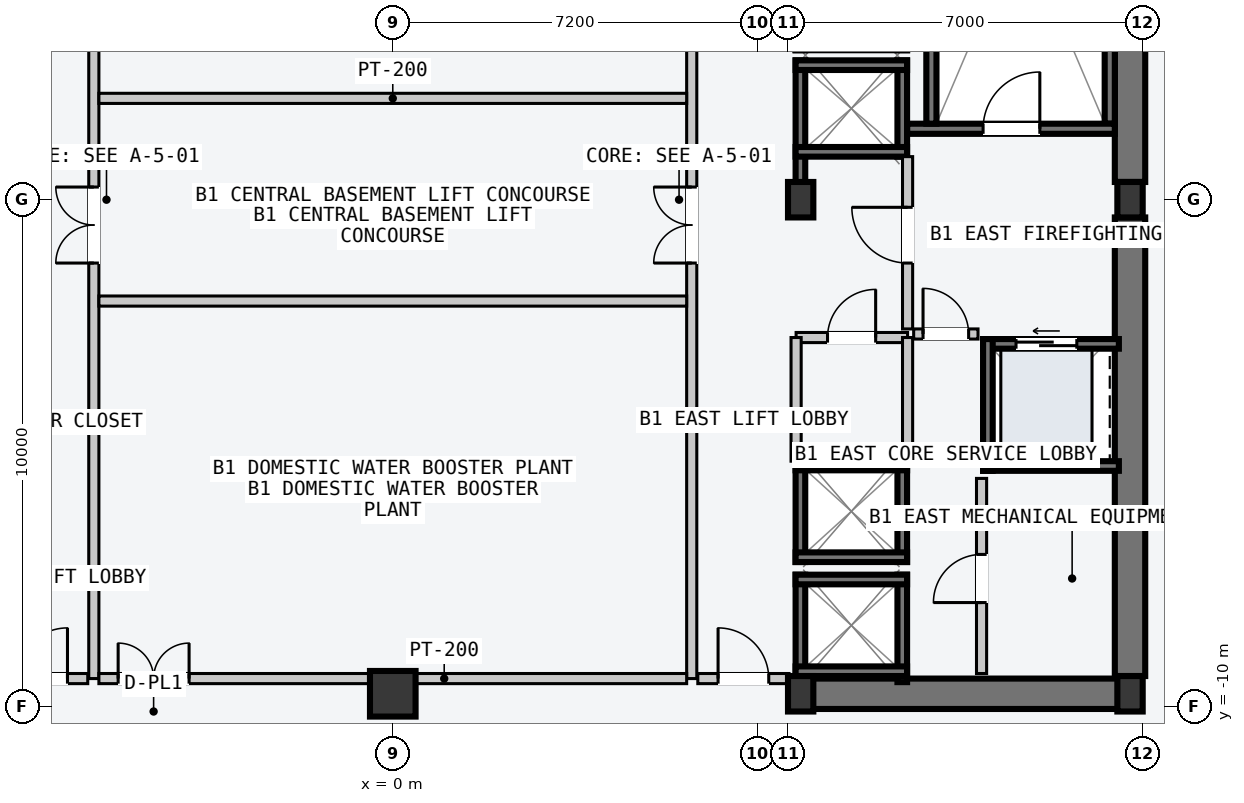
"""IFC4 building model, lengths in metres.
Left out: names, types, materials, properties, quantities, classifications, styles, units other than length and angle.
Written with IfcOpenShell. Run it as: python <this file> out.ifc"""

import sys

from ifc_helpers import new_model, si_unit, direction, frame, frame_2d, origin, origin_2d, place, context, subcontext, project, spatial, rectangle, hollow_rectangle, i_section, extrude, element, fill, save


model = new_model("IFC4")
c1 = context("Model", 3, precision=1e-05, world=origin(), true_north=direction((0.0, 1.0)))
c2 = subcontext(c1, "Body", "Model", "MODEL_VIEW")
j1 = project(units=[si_unit("LENGTHUNIT", "METRE"), si_unit("PLANEANGLEUNIT", "RADIAN")], contexts=[c1])
p1 = place(None, origin())
s1 = spatial("IfcSite", under=j1, at=p1, CompositionType="ELEMENT")
p2 = place(p1, origin())
s2 = spatial("IfcBuilding", under=s1, at=p2, CompositionType="ELEMENT")
p3 = place(p2, frame((0.0, 0.0, -4.8)))
s3 = spatial("IfcBuildingStorey", under=s2, at=p3, CompositionType="ELEMENT", Elevation=-4.8)
p4 = place(p3, frame((8.07, -9.75, -0.22), z_axis=(0.0, 0.0, 1.0), x_axis=(1.0, 0.0, 0.0)))
e1 = element("IfcWall", 1, at=p4, inside=s3, PredefinedType="SHEAR", context=c2, shape_type="SweptSolid", body=[
    extrude(rectangle(XDim=6.46, YDim=0.6, at=frame_2d((3.23, 0.0))), origin(), (0.0, 0.0, 1.0), 4.8),
])
for number, where, z_axis, x_axis in (
    (2, (14.55, -9.4, -0.22), (0.0, 0.0, 1.0), (0.0, 1.0, 0.0)),
    (3, (14.55, 0.35, -0.22), (0.0, 0.0, 1.0), (0.0, 1.0, 0.0)),
):
    element("IfcWall", number, at=place(p3, frame(where, z_axis=z_axis, x_axis=x_axis)), inside=s3, PredefinedType="SHEAR", context=c2, shape_type="SweptSolid", body=[
        extrude(rectangle(XDim=9.05, YDim=0.6, at=frame_2d((4.525, 0.0))), origin(), (0.0, 0.0, 1.0), 4.8),
    ])
p5 = place(p3, frame((14.15, 1.5, -0.22), z_axis=(0.0, 0.0, 1.0), x_axis=(0.0, 1.0, 0.0)))
e4 = element("IfcWall", 4, at=p5, inside=s3, PredefinedType="SOLIDWALL", context=c2, shape_type="SweptSolid", body=[
    extrude(rectangle(XDim=7.8, YDim=0.2, at=frame_2d((3.9, 0.0))), origin(), (0.0, 0.0, 1.0), 4.8),
])
p6 = place(p3, frame((10.15, 1.4, -0.22), z_axis=(0.0, 0.0, 1.0), x_axis=(1.0, 0.0, 0.0)))
e5 = element("IfcWall", 5, at=p6, inside=s3, PredefinedType="SOLIDWALL", context=c2, shape_type="SweptSolid", body=[
    extrude(rectangle(XDim=4.1, YDim=0.2, at=frame_2d((2.05, 0.0))), origin(), (0.0, 0.0, 1.0), 4.8),
])
p7 = place(p6, frame((1.5, 0.0, 0.22)))
e6 = element("IfcOpeningElement", 6, at=p7, cuts=e5, PredefinedType="OPENING", context=c2, shape_type="SweptSolid", body=[
    extrude(rectangle(XDim=1.12, YDim=2.18, at=frame_2d((0.56, 1.09))), frame((0.0, 0.11, 0.0), z_axis=(0.0, -1.0, 0.0), x_axis=(1.0, 0.0, 0.0)), (0.0, 0.0, 1.0), 0.22),
])
p8 = place(p3, frame((10.63, 1.5, -0.22), z_axis=(0.0, 0.0, 1.0), x_axis=(0.0, 1.0, 0.0)))
e7 = element("IfcWall", 7, at=p8, inside=s3, PredefinedType="SOLIDWALL", context=c2, shape_type="SweptSolid", body=[
    extrude(rectangle(XDim=7.8, YDim=0.2, at=frame_2d((3.9, 0.0))), origin(), (0.0, 0.0, 1.0), 4.8),
])
for number, where, z_axis, x_axis in (
    (8, (8.05, -9.75, 0.0), (0.0, 0.0, 1.0), (1.0, 0.0, 0.0)),
    (9, (8.05, 0.0, 0.0), (0.0, 0.0, 1.0), (1.0, 0.0, 0.0)),
    (10, (14.55, -9.75, 0.0), (0.0, 0.0, 1.0), (1.0, 0.0, 0.0)),
    (11, (14.55, 0.0, 0.0), (0.0, 0.0, 1.0), (1.0, 0.0, 0.0)),
):
    element("IfcColumn", number, at=place(p3, frame(where, z_axis=z_axis, x_axis=x_axis)), inside=s3, PredefinedType="COLUMN", context=c2, shape_type="SweptSolid", body=[
        extrude(i_section(OverallWidth=0.5, OverallDepth=0.7, WebThickness=0.028, FlangeThickness=0.045, at=origin_2d()), origin(), (0.0, 0.0, 1.0), 4.8),
    ])
p9 = place(p3, frame((0.0, -9.75, 0.0), z_axis=(0.0, 0.0, 1.0), x_axis=(1.0, 0.0, 0.0)))
e12 = element("IfcColumn", 12, at=p9, inside=s3, PredefinedType="COLUMN", context=c2, shape_type="SweptSolid", body=[
    extrude(hollow_rectangle(XDim=0.9, YDim=0.9, WallThickness=0.045, at=origin_2d()), origin(), (0.0, 0.0, 1.0), 4.8),
])
p10 = place(p3, frame((8.045, 0.21, -0.22), z_axis=(0.0, 0.0, 1.0), x_axis=(0.0, 1.0, 0.0)))
e13 = element("IfcWall", 13, at=p10, inside=s3, PredefinedType="SOLIDWALL", context=c2, shape_type="SweptSolid", body=[
    extrude(rectangle(XDim=2.54, YDim=0.19, at=frame_2d((1.27, 0.0))), origin(), (0.0, 0.0, 1.0), 4.8),
])
p11 = place(p3, frame((10.055, 0.85, -0.22), z_axis=(0.0, 0.0, 1.0), x_axis=(0.0, 1.0, 0.0)))
e14 = element("IfcWall", 14, at=p11, inside=s3, PredefinedType="SOLIDWALL", context=c2, shape_type="SweptSolid", body=[
    extrude(rectangle(XDim=1.9, YDim=0.19, at=frame_2d((0.95, 0.0))), origin(), (0.0, 0.0, 1.0), 4.8),
])
for number, where, z_axis, x_axis in (
    (15, (7.95, 2.655, -0.22), (0.0, 0.0, 1.0), (1.0, 0.0, 0.0)),
    (16, (7.95, 0.945, -0.22), (0.0, 0.0, 1.0), (1.0, 0.0, 0.0)),
):
    element("IfcWall", number, at=place(p3, frame(where, z_axis=z_axis, x_axis=x_axis)), inside=s3, PredefinedType="SOLIDWALL", context=c2, shape_type="SweptSolid", body=[
        extrude(rectangle(XDim=2.2, YDim=0.19, at=frame_2d((1.1, 0.0))), origin(), (0.0, 0.0, 1.0), 4.8),
    ])
for number, where, z_axis, x_axis in (
    (17, (8.045, -9.52, -0.22), (0.0, 0.0, 1.0), (0.0, 1.0, 0.0)),
    (18, (10.055, -9.52, -0.22), (0.0, 0.0, 1.0), (0.0, 1.0, 0.0)),
):
    element("IfcWall", number, at=place(p3, frame(where, z_axis=z_axis, x_axis=x_axis)), inside=s3, PredefinedType="SOLIDWALL", context=c2, shape_type="SweptSolid", body=[
        extrude(rectangle(XDim=2.12, YDim=0.19, at=frame_2d((1.06, 0.0))), origin(), (0.0, 0.0, 1.0), 4.8),
    ])
for number, where, z_axis, x_axis in (
    (19, (7.95, -7.495, -0.22), (0.0, 0.0, 1.0), (1.0, 0.0, 0.0)),
    (20, (7.95, -9.305, -0.22), (0.0, 0.0, 1.0), (1.0, 0.0, 0.0)),
):
    element("IfcWall", number, at=place(p3, frame(where, z_axis=z_axis, x_axis=x_axis)), inside=s3, PredefinedType="SOLIDWALL", context=c2, shape_type="SweptSolid", body=[
        extrude(rectangle(XDim=2.2, YDim=0.19, at=frame_2d((1.1, 0.0))), origin(), (0.0, 0.0, 1.0), 4.8),
    ])
for number, where, z_axis, x_axis in (
    (21, (8.045, -7.15, -0.22), (0.0, 0.0, 1.0), (0.0, 1.0, 0.0)),
    (22, (10.055, -7.15, -0.22), (0.0, 0.0, 1.0), (0.0, 1.0, 0.0)),
):
    element("IfcWall", number, at=place(p3, frame(where, z_axis=z_axis, x_axis=x_axis)), inside=s3, PredefinedType="SOLIDWALL", context=c2, shape_type="SweptSolid", body=[
        extrude(rectangle(XDim=2.0, YDim=0.19, at=frame_2d((1.0, 0.0))), origin(), (0.0, 0.0, 1.0), 4.8),
    ])
for number, where, z_axis, x_axis in (
    (23, (7.95, -5.245, -0.22), (0.0, 0.0, 1.0), (1.0, 0.0, 0.0)),
    (24, (7.95, -7.055, -0.22), (0.0, 0.0, 1.0), (1.0, 0.0, 0.0)),
):
    element("IfcWall", number, at=place(p3, frame(where, z_axis=z_axis, x_axis=x_axis)), inside=s3, PredefinedType="SOLIDWALL", context=c2, shape_type="SweptSolid", body=[
        extrude(rectangle(XDim=2.2, YDim=0.19, at=frame_2d((1.1, 0.0))), origin(), (0.0, 0.0, 1.0), 4.8),
    ])
p12 = place(p3, frame((11.65, -2.845, -0.22), z_axis=(0.0, 0.0, 1.0), x_axis=(1.0, 0.0, 0.0)))
e25 = element("IfcWall", 25, at=p12, inside=s3, PredefinedType="SOLIDWALL", context=c2, shape_type="SweptSolid", body=[
    extrude(rectangle(XDim=2.68, YDim=0.19, at=frame_2d((1.34, 0.0))), origin(), (0.0, 0.0, 1.0), 4.8),
])
p13 = place(p12, frame((0.65, 0.0, 0.22)))
e26 = element("IfcOpeningElement", 26, at=p13, cuts=e25, PredefinedType="OPENING", context=c2, shape_type="SweptSolid", body=[
    extrude(rectangle(XDim=1.2, YDim=2.2, at=frame_2d((0.6, 1.1))), frame((0.0, 0.105, 0.0), z_axis=(0.0, -1.0, 0.0), x_axis=(1.0, 0.0, 0.0)), (0.0, 0.0, 1.0), 0.21),
])
p14 = place(p3, frame((11.65, -5.255, -0.22), z_axis=(0.0, 0.0, 1.0), x_axis=(1.0, 0.0, 0.0)))
e27 = element("IfcWall", 27, at=p14, inside=s3, PredefinedType="SOLIDWALL", context=c2, shape_type="SweptSolid", body=[
    extrude(rectangle(XDim=2.68, YDim=0.19, at=frame_2d((1.34, 0.0))), origin(), (0.0, 0.0, 1.0), 4.8),
])
p15 = place(p3, frame((11.745, -5.35, -0.22), z_axis=(0.0, 0.0, 1.0), x_axis=(0.0, 1.0, 0.0)))
e28 = element("IfcWall", 28, at=p15, inside=s3, PredefinedType="SOLIDWALL", context=c2, shape_type="SweptSolid", body=[
    extrude(rectangle(XDim=2.6, YDim=0.19, at=frame_2d((1.3, 0.0))), origin(), (0.0, 0.0, 1.0), 4.8),
])
p16 = place(p3, frame((-5.9, -9.45, 0.0), z_axis=(0.0, 0.0, 1.0), x_axis=(0.0, 1.0, 0.0)))
e29 = element("IfcWall", 29, at=p16, inside=s3, PredefinedType="PARTITIONING", context=c2, shape_type="SweptSolid", body=[
    extrude(rectangle(XDim=18.9, YDim=0.2, at=frame_2d((9.45, 0.0))), origin(), (0.0, 0.0, 1.0), 4.58),
])
p17 = place(p16, frame((8.2, 0.0, 0.0)))
e30 = element("IfcOpeningElement", 30, at=p17, cuts=e29, PredefinedType="OPENING", context=c2, shape_type="SweptSolid", body=[
    extrude(rectangle(XDim=1.5, YDim=2.2, at=frame_2d((0.75, 1.1))), frame((0.0, 0.11, 0.0), z_axis=(0.0, -1.0, 0.0), x_axis=(1.0, 0.0, 0.0)), (0.0, 0.0, 1.0), 0.22),
])
p18 = place(p3, frame((5.9, -9.45, 0.0), z_axis=(0.0, 0.0, 1.0), x_axis=(0.0, 1.0, 0.0)))
e31 = element("IfcWall", 31, at=p18, inside=s3, PredefinedType="PARTITIONING", context=c2, shape_type="SweptSolid", body=[
    extrude(rectangle(XDim=18.9, YDim=0.2, at=frame_2d((9.45, 0.0))), origin(), (0.0, 0.0, 1.0), 4.58),
])
p19 = place(p18, frame((8.2, 0.0, 0.0)))
e32 = element("IfcOpeningElement", 32, at=p19, cuts=e31, PredefinedType="OPENING", context=c2, shape_type="SweptSolid", body=[
    extrude(rectangle(XDim=1.5, YDim=2.2, at=frame_2d((0.75, 1.1))), frame((0.0, 0.11, 0.0), z_axis=(0.0, -1.0, 0.0), x_axis=(1.0, 0.0, 0.0)), (0.0, 0.0, 1.0), 0.22),
])
p20 = place(p3, frame((10.16, -2.55, 0.0), z_axis=(0.0, 0.0, 1.0), x_axis=(0.0, 1.0, 0.0)))
e33 = element("IfcWall", 33, at=p20, inside=s3, PredefinedType="PARTITIONING", context=c2, shape_type="SweptSolid", body=[
    extrude(rectangle(XDim=3.4, YDim=0.2, at=frame_2d((1.7, 0.0))), origin(), (0.0, 0.0, 1.0), 4.58),
])
p21 = place(p20, frame((1.3, 0.0, 0.0)))
e34 = element("IfcOpeningElement", 34, at=p21, cuts=e33, PredefinedType="OPENING", context=c2, shape_type="SweptSolid", body=[
    extrude(rectangle(XDim=1.1, YDim=2.15, at=frame_2d((0.55, 1.075))), frame((0.0, 0.11, 0.0), z_axis=(0.0, -1.0, 0.0), x_axis=(1.0, 0.0, 0.0)), (0.0, 0.0, 1.0), 0.22),
])
p22 = place(p3, frame((10.28, -2.65, 0.0), z_axis=(0.0, 0.0, 1.0), x_axis=(1.0, 0.0, 0.0)))
e35 = element("IfcWall", 35, at=p22, inside=s3, PredefinedType="PARTITIONING", context=c2, shape_type="SweptSolid", body=[
    extrude(rectangle(XDim=1.27, YDim=0.2, at=frame_2d((0.635, 0.0))), origin(), (0.0, 0.0, 1.0), 4.58),
])
p23 = place(p22, frame((0.185, 0.0, 0.0)))
e36 = element("IfcOpeningElement", 36, at=p23, cuts=e35, PredefinedType="OPENING", context=c2, shape_type="SweptSolid", body=[
    extrude(rectangle(XDim=0.9, YDim=2.15, at=frame_2d((0.45, 1.075))), frame((0.0, 0.11, 0.0), z_axis=(0.0, -1.0, 0.0), x_axis=(1.0, 0.0, 0.0)), (0.0, 0.0, 1.0), 0.22),
])
p24 = place(p3, frame((7.96, -2.72, 0.0), z_axis=(0.0, 0.0, 1.0), x_axis=(1.0, 0.0, 0.0)))
e37 = element("IfcWall", 37, at=p24, inside=s3, PredefinedType="PARTITIONING", context=c2, shape_type="SweptSolid", body=[
    extrude(rectangle(XDim=2.2, YDim=0.2, at=frame_2d((1.1, 0.0))), origin(), (0.0, 0.0, 1.0), 4.58),
])
p25 = place(p24, frame((0.62, 0.0, 0.0)))
e38 = element("IfcOpeningElement", 38, at=p25, cuts=e37, PredefinedType="OPENING", context=c2, shape_type="SweptSolid", body=[
    extrude(rectangle(XDim=0.95, YDim=2.1, at=frame_2d((0.475, 1.05))), frame((0.0, 0.11, 0.0), z_axis=(0.0, -1.0, 0.0), x_axis=(1.0, 0.0, 0.0)), (0.0, 0.0, 1.0), 0.22),
])
for number, where, z_axis, x_axis in (
    (39, (7.96, -5.16, 0.0), (0.0, 0.0, 1.0), (0.0, 1.0, 0.0)),
    (40, (10.16, -5.16, 0.0), (0.0, 0.0, 1.0), (0.0, 1.0, 0.0)),
):
    element("IfcWall", number, at=place(p3, frame(where, z_axis=z_axis, x_axis=x_axis)), inside=s3, PredefinedType="PARTITIONING", context=c2, shape_type="SweptSolid", body=[
        extrude(rectangle(XDim=2.44, YDim=0.2, at=frame_2d((1.22, 0.0))), origin(), (0.0, 0.0, 1.0), 4.58),
    ])
p26 = place(p3, frame((11.62, -9.35, 0.0), z_axis=(0.0, 0.0, 1.0), x_axis=(0.0, 1.0, 0.0)))
e41 = element("IfcWall", 41, at=p26, inside=s3, PredefinedType="PARTITIONING", context=c2, shape_type="SweptSolid", body=[
    extrude(rectangle(XDim=3.85, YDim=0.2, at=frame_2d((1.925, 0.0))), origin(), (0.0, 0.0, 1.0), 4.58),
])
p27 = place(p26, frame((1.4, 0.0, 0.0)))
e42 = element("IfcOpeningElement", 42, at=p27, cuts=e41, PredefinedType="OPENING", context=c2, shape_type="SweptSolid", body=[
    extrude(rectangle(XDim=0.95, YDim=2.1, at=frame_2d((0.475, 1.05))), frame((0.0, 0.11, 0.0), z_axis=(0.0, -1.0, 0.0), x_axis=(1.0, 0.0, 0.0)), (0.0, 0.0, 1.0), 0.22),
])
p28 = place(p3, frame((-7.82, -9.45, 0.0), z_axis=(0.0, 0.0, 1.0), x_axis=(1.0, 0.0, 0.0)))
e43 = element("IfcWall", 43, at=p28, inside=s3, PredefinedType="PARTITIONING", context=c2, shape_type="SweptSolid", body=[
    extrude(rectangle(XDim=1.8, YDim=0.2, at=frame_2d((0.9, 0.0))), origin(), (0.0, 0.0, 1.0), 4.58),
])
p29 = place(p28, frame((0.4, 0.0, 0.0)))
e44 = element("IfcOpeningElement", 44, at=p29, cuts=e43, PredefinedType="OPENING", context=c2, shape_type="SweptSolid", body=[
    extrude(rectangle(XDim=1.0, YDim=2.15, at=frame_2d((0.5, 1.075))), frame((0.0, 0.11, 0.0), z_axis=(0.0, -1.0, 0.0), x_axis=(1.0, 0.0, 0.0)), (0.0, 0.0, 1.0), 0.22),
])
p30 = place(p3, frame((6.02, -9.45, 0.0), z_axis=(0.0, 0.0, 1.0), x_axis=(1.0, 0.0, 0.0)))
e45 = element("IfcWall", 45, at=p30, inside=s3, PredefinedType="PARTITIONING", context=c2, shape_type="SweptSolid", body=[
    extrude(rectangle(XDim=1.8, YDim=0.2, at=frame_2d((0.9, 0.0))), origin(), (0.0, 0.0, 1.0), 4.58),
])
p31 = place(p30, frame((0.4, 0.0, 0.0)))
e46 = element("IfcOpeningElement", 46, at=p31, cuts=e45, PredefinedType="OPENING", context=c2, shape_type="SweptSolid", body=[
    extrude(rectangle(XDim=1.0, YDim=2.15, at=frame_2d((0.5, 1.075))), frame((0.0, 0.11, 0.0), z_axis=(0.0, -1.0, 0.0), x_axis=(1.0, 0.0, 0.0)), (0.0, 0.0, 1.0), 0.22),
])
p32 = place(p3, frame((-5.8, -9.45, 0.0), z_axis=(0.0, 0.0, 1.0), x_axis=(1.0, 0.0, 0.0)))
e47 = element("IfcWall", 47, at=p32, inside=s3, PredefinedType="PARTITIONING", context=c2, shape_type="SweptSolid", body=[
    extrude(rectangle(XDim=11.6, YDim=0.2, at=frame_2d((5.8, 0.0))), origin(), (0.0, 0.0, 1.0), 4.58),
])
p33 = place(p32, frame((0.38, 0.0, 0.0)))
e48 = element("IfcOpeningElement", 48, at=p33, cuts=e47, PredefinedType="OPENING", context=c2, shape_type="SweptSolid", body=[
    extrude(rectangle(XDim=1.4, YDim=2.25, at=frame_2d((0.7, 1.125))), frame((0.0, 0.11, 0.0), z_axis=(0.0, -1.0, 0.0), x_axis=(1.0, 0.0, 0.0)), (0.0, 0.0, 1.0), 0.22),
])
for number, where, z_axis, x_axis in (
    (49, (-5.8, -2.0, 0.0), (0.0, 0.0, 1.0), (1.0, 0.0, 0.0)),
    (50, (-5.8, 2.0, 0.0), (0.0, 0.0, 1.0), (1.0, 0.0, 0.0)),
):
    element("IfcWall", number, at=place(p3, frame(where, z_axis=z_axis, x_axis=x_axis)), inside=s3, PredefinedType="PARTITIONING", context=c2, shape_type="SweptSolid", body=[
        extrude(rectangle(XDim=11.6, YDim=0.2, at=frame_2d((5.8, 0.0))), origin(), (0.0, 0.0, 1.0), 4.58),
    ])
p34 = place(p7, origin())
e51 = element("IfcDoor", 51, at=p34, inside=s3, OperationType="SINGLE_SWING_RIGHT", PredefinedType="DOOR", context=c2, shape_type="SweptSolid", body=[
    extrude(rectangle(XDim=1.12, YDim=2.18, at=frame_2d((0.56, 1.09))), frame((0.0, 0.025, 0.0), z_axis=(0.0, -1.0, 0.0), x_axis=(1.0, 0.0, 0.0)), (0.0, 0.0, 1.0), 0.05),
])
fill(e6, e51)
p35 = place(p13, origin())
e52 = element("IfcDoor", 52, at=p35, inside=s3, OperationType="SLIDING_TO_LEFT", PredefinedType="DOOR", context=c2, shape_type="SweptSolid", body=[
    extrude(rectangle(XDim=1.2, YDim=2.2, at=frame_2d((0.6, 1.1))), frame((0.0, 0.025, 0.0), z_axis=(0.0, -1.0, 0.0), x_axis=(1.0, 0.0, 0.0)), (0.0, 0.0, 1.0), 0.05),
])
fill(e26, e52)
p36 = place(p17, origin())
e53 = element("IfcDoor", 53, at=p36, inside=s3, OperationType="DOUBLE_DOOR_SINGLE_SWING", PredefinedType="DOOR", context=c2, shape_type="SweptSolid", body=[
    extrude(rectangle(XDim=1.5, YDim=2.2, at=frame_2d((0.75, 1.1))), frame((0.0, 0.025, 0.0), z_axis=(0.0, -1.0, 0.0), x_axis=(1.0, 0.0, 0.0)), (0.0, 0.0, 1.0), 0.05),
])
fill(e30, e53)
p37 = place(p19, origin())
e54 = element("IfcDoor", 54, at=p37, inside=s3, OperationType="DOUBLE_DOOR_SINGLE_SWING", PredefinedType="DOOR", context=c2, shape_type="SweptSolid", body=[
    extrude(rectangle(XDim=1.5, YDim=2.2, at=frame_2d((0.75, 1.1))), frame((0.0, 0.025, 0.0), z_axis=(0.0, -1.0, 0.0), x_axis=(1.0, 0.0, 0.0)), (0.0, 0.0, 1.0), 0.05),
])
fill(e32, e54)
p38 = place(p21, origin())
e55 = element("IfcDoor", 55, at=p38, inside=s3, OperationType="SINGLE_SWING_RIGHT", PredefinedType="DOOR", context=c2, shape_type="SweptSolid", body=[
    extrude(rectangle(XDim=1.1, YDim=2.15, at=frame_2d((0.55, 1.075))), frame((0.0, 0.025, 0.0), z_axis=(0.0, -1.0, 0.0), x_axis=(1.0, 0.0, 0.0)), (0.0, 0.0, 1.0), 0.05),
])
fill(e34, e55)
p39 = place(p23, origin())
e56 = element("IfcDoor", 56, at=p39, inside=s3, OperationType="SINGLE_SWING_LEFT", PredefinedType="DOOR", context=c2, shape_type="SweptSolid", body=[
    extrude(rectangle(XDim=0.9, YDim=2.15, at=frame_2d((0.45, 1.075))), frame((0.0, 0.025, 0.0), z_axis=(0.0, -1.0, 0.0), x_axis=(1.0, 0.0, 0.0)), (0.0, 0.0, 1.0), 0.05),
])
fill(e36, e56)
p40 = place(p25, origin())
e57 = element("IfcDoor", 57, at=p40, inside=s3, OperationType="SINGLE_SWING_RIGHT", PredefinedType="DOOR", context=c2, shape_type="SweptSolid", body=[
    extrude(rectangle(XDim=0.95, YDim=2.1, at=frame_2d((0.475, 1.05))), frame((0.0, 0.025, 0.0), z_axis=(0.0, -1.0, 0.0), x_axis=(1.0, 0.0, 0.0)), (0.0, 0.0, 1.0), 0.05),
])
fill(e38, e57)
p41 = place(p27, origin())
e58 = element("IfcDoor", 58, at=p41, inside=s3, OperationType="SINGLE_SWING_LEFT", PredefinedType="DOOR", context=c2, shape_type="SweptSolid", body=[
    extrude(rectangle(XDim=0.95, YDim=2.1, at=frame_2d((0.475, 1.05))), frame((0.0, 0.025, 0.0), z_axis=(0.0, -1.0, 0.0), x_axis=(1.0, 0.0, 0.0)), (0.0, 0.0, 1.0), 0.05),
])
fill(e42, e58)
p42 = place(p29, origin())
e59 = element("IfcDoor", 59, at=p42, inside=s3, OperationType="SINGLE_SWING_RIGHT", PredefinedType="DOOR", context=c2, shape_type="SweptSolid", body=[
    extrude(rectangle(XDim=1.0, YDim=2.15, at=frame_2d((0.5, 1.075))), frame((0.0, 0.025, 0.0), z_axis=(0.0, -1.0, 0.0), x_axis=(1.0, 0.0, 0.0)), (0.0, 0.0, 1.0), 0.05),
])
fill(e44, e59)
p43 = place(p31, origin())
e60 = element("IfcDoor", 60, at=p43, inside=s3, OperationType="SINGLE_SWING_LEFT", PredefinedType="DOOR", context=c2, shape_type="SweptSolid", body=[
    extrude(rectangle(XDim=1.0, YDim=2.15, at=frame_2d((0.5, 1.075))), frame((0.0, 0.025, 0.0), z_axis=(0.0, -1.0, 0.0), x_axis=(1.0, 0.0, 0.0)), (0.0, 0.0, 1.0), 0.05),
])
fill(e46, e60)
p44 = place(p33, origin())
e61 = element("IfcDoor", 61, at=p44, inside=s3, OperationType="DOUBLE_DOOR_SINGLE_SWING", PredefinedType="DOOR", context=c2, shape_type="SweptSolid", body=[
    extrude(rectangle(XDim=1.4, YDim=2.25, at=frame_2d((0.7, 1.125))), frame((0.0, 0.025, 0.0), z_axis=(0.0, -1.0, 0.0), x_axis=(1.0, 0.0, 0.0)), (0.0, 0.0, 1.0), 0.05),
])
fill(e48, e61)
save(model, sys.argv[1])
